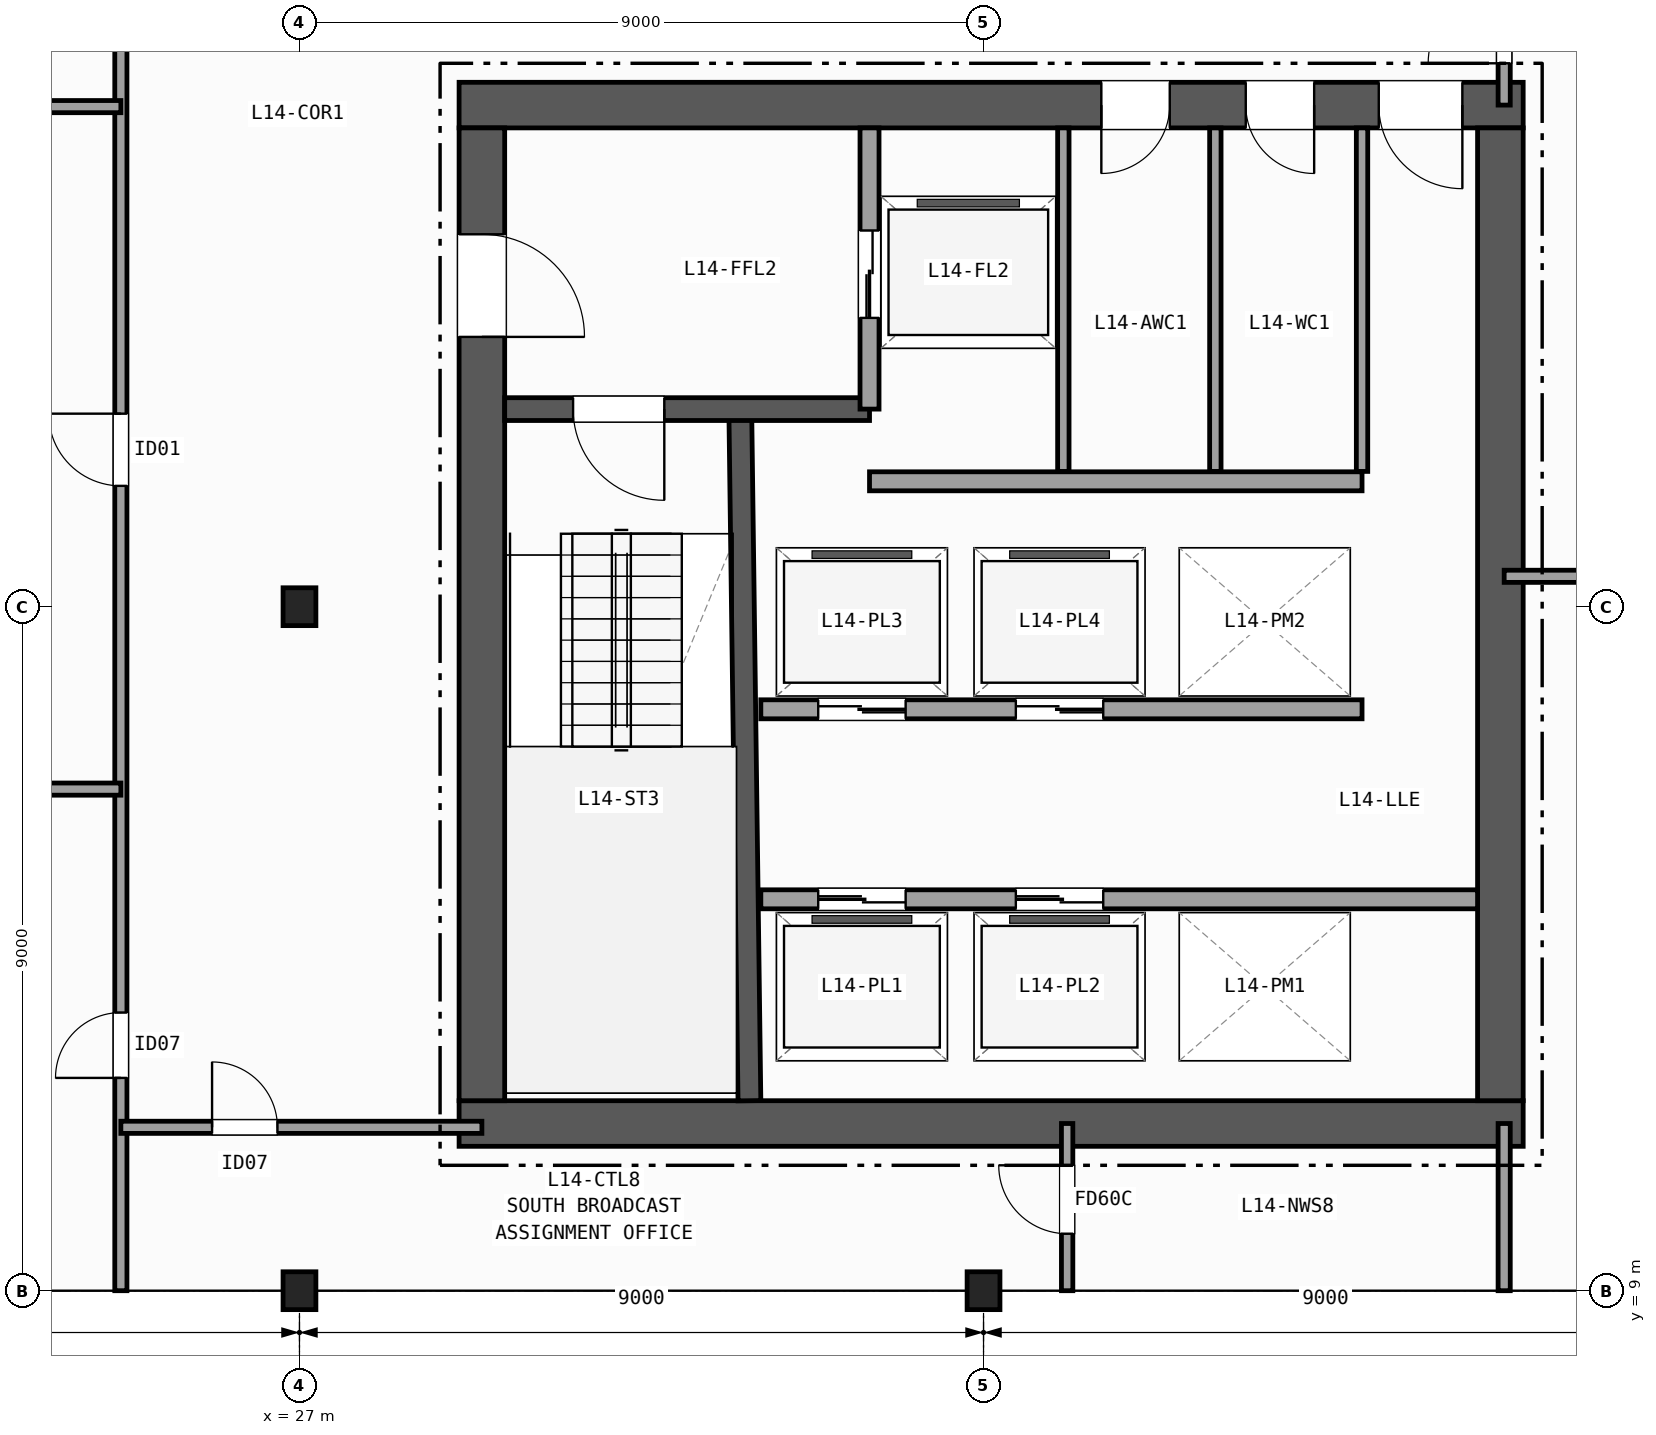
"""IFC4 building model, lengths in metres.
Left out: names, types, materials, properties, quantities, classifications, styles, units other than length and angle.
Written with IfcOpenShell. Run it as: python <this file> out.ifc"""

import sys

from ifc_helpers import new_model, si_unit, direction, frame, frame_2d, origin, origin_2d, place, context, subcontext, project, spatial, rectangle, i_section, extrude, element, fill, save


model = new_model("IFC4")
c1 = context("Model", 3, precision=1e-05, world=origin(), true_north=direction((0.0, 1.0)))
c2 = subcontext(c1, "Body", "Model", "MODEL_VIEW")
j1 = project(units=[si_unit("LENGTHUNIT", "METRE"), si_unit("PLANEANGLEUNIT", "RADIAN")], contexts=[c1])
p1 = place(None, origin())
s1 = spatial("IfcSite", under=j1, at=p1, CompositionType="ELEMENT")
p2 = place(p1, origin())
s2 = spatial("IfcBuilding", under=s1, at=p2, CompositionType="ELEMENT")
p3 = place(p2, frame((0.0, 0.0, 61.9)))
s3 = spatial("IfcBuildingStorey", under=s2, at=p3, CompositionType="ELEMENT", Elevation=61.9)
for number, where, z_axis, x_axis in (
    (1, (27.0, 9.0, 0.0), (0.0, 0.0, 1.0), (1.0, 0.0, 0.0)),
    (2, (27.0, 18.0, 0.0), (0.0, 0.0, 1.0), (1.0, 0.0, 0.0)),
    (3, (36.0, 9.0, 0.0), (0.0, 0.0, 1.0), (1.0, 0.0, 0.0)),
):
    element("IfcColumn", number, at=place(p3, frame(where, z_axis=z_axis, x_axis=x_axis)), inside=s3, PredefinedType="COLUMN", context=c2, shape_type="SweptSolid", body=[
        extrude(i_section(OverallWidth=0.432, OverallDepth=0.498, WebThickness=0.056, FlangeThickness=0.089, FilletRadius=0.015, at=origin_2d()), origin(), (0.0, 0.0, 1.0), 3.7),
    ])
p4 = place(p3, frame((29.1, 11.2, 0.0), z_axis=(0.0, 0.0, 1.0), x_axis=(1.0, 0.0, 0.0)))
e4 = element("IfcWall", 4, at=p4, inside=s3, PredefinedType="SHEAR", context=c2, shape_type="SweptSolid", body=[
    extrude(rectangle(XDim=14.0, YDim=0.6, at=frame_2d((7.0, 0.0))), origin(), (0.0, 0.0, 1.0), 3.42),
])
p5 = place(p3, frame((43.1, 24.6, 0.0), z_axis=(0.0, 0.0, 1.0), x_axis=(-1.0, 0.0, 0.0)))
e5 = element("IfcWall", 5, at=p5, inside=s3, PredefinedType="SHEAR", context=c2, shape_type="SweptSolid", body=[
    extrude(rectangle(XDim=14.0, YDim=0.6, at=frame_2d((7.0, 0.0))), origin(), (0.0, 0.0, 1.0), 3.42),
])
p6 = place(p5, frame((0.8, 0.0, 0.0)))
e6 = element("IfcOpeningElement", 6, at=p6, cuts=e5, PredefinedType="OPENING", context=c2, shape_type="SweptSolid", body=[
    extrude(rectangle(XDim=1.1, YDim=2.15, at=frame_2d((0.55, 1.075))), frame((0.0, 0.31, 0.0), z_axis=(0.0, -1.0, 0.0), x_axis=(1.0, 0.0, 0.0)), (0.0, 0.0, 1.0), 0.62),
])
p7 = place(p5, frame((2.75, 0.0, 0.0)))
e7 = element("IfcOpeningElement", 7, at=p7, cuts=e5, PredefinedType="OPENING", context=c2, shape_type="SweptSolid", body=[
    extrude(rectangle(XDim=0.9, YDim=2.1, at=frame_2d((0.45, 1.05))), frame((0.0, 0.31, 0.0), z_axis=(0.0, -1.0, 0.0), x_axis=(1.0, 0.0, 0.0)), (0.0, 0.0, 1.0), 0.62),
])
p8 = place(p5, frame((4.65, 0.0, 0.0)))
e8 = element("IfcOpeningElement", 8, at=p8, cuts=e5, PredefinedType="OPENING", context=c2, shape_type="SweptSolid", body=[
    extrude(rectangle(XDim=0.9, YDim=2.1, at=frame_2d((0.45, 1.05))), frame((0.0, 0.31, 0.0), z_axis=(0.0, -1.0, 0.0), x_axis=(1.0, 0.0, 0.0)), (0.0, 0.0, 1.0), 0.62),
])
p9 = place(p3, frame((29.4, 24.3, 0.0), z_axis=(0.0, 0.0, 1.0), x_axis=(0.0, -1.0, 0.0)))
e9 = element("IfcWall", 9, at=p9, inside=s3, PredefinedType="SHEAR", context=c2, shape_type="SweptSolid", body=[
    extrude(rectangle(XDim=12.8, YDim=0.6, at=frame_2d((6.4, 0.0))), origin(), (0.0, 0.0, 1.0), 3.42),
])
p10 = place(p9, frame((1.4, 0.0, 0.0)))
e10 = element("IfcOpeningElement", 10, at=p10, cuts=e9, PredefinedType="OPENING", context=c2, shape_type="SweptSolid", body=[
    extrude(rectangle(XDim=1.35, YDim=2.15, at=frame_2d((0.675, 1.075))), frame((0.0, 0.31, 0.0), z_axis=(0.0, -1.0, 0.0), x_axis=(1.0, 0.0, 0.0)), (0.0, 0.0, 1.0), 0.62),
])
p11 = place(p3, frame((42.8, 11.5, 0.0), z_axis=(0.0, 0.0, 1.0), x_axis=(0.0, 1.0, 0.0)))
e11 = element("IfcWall", 11, at=p11, inside=s3, PredefinedType="SHEAR", context=c2, shape_type="SweptSolid", body=[
    extrude(rectangle(XDim=12.8, YDim=0.6, at=frame_2d((6.4, 0.0))), origin(), (0.0, 0.0, 1.0), 3.42),
])
p12 = place(p3, frame((32.92, 11.5, 0.0), z_axis=(0.0, 0.0, 1.0), x_axis=(-0.013244407292, 0.999912288991, 0.0)))
e12 = element("IfcWall", 12, at=p12, inside=s3, PredefinedType="SHEAR", context=c2, shape_type="SweptSolid", body=[
    extrude(rectangle(XDim=9.051, YDim=0.3, at=frame_2d((4.525, 0.0))), origin(), (0.0, 0.0, 1.0), 3.42),
])
p13 = place(p3, frame((34.5, 20.6, 0.0), z_axis=(0.0, 0.0, 1.0), x_axis=(-1.0, 0.0, 0.0)))
e13 = element("IfcWall", 13, at=p13, inside=s3, PredefinedType="SHEAR", context=c2, shape_type="SweptSolid", body=[
    extrude(rectangle(XDim=4.8, YDim=0.3, at=frame_2d((2.4, 0.0))), origin(), (0.0, 0.0, 1.0), 3.42),
])
p14 = place(p13, frame((2.7, 0.0, 0.0)))
e14 = element("IfcOpeningElement", 14, at=p14, cuts=e13, PredefinedType="OPENING", context=c2, shape_type="SweptSolid", body=[
    extrude(rectangle(XDim=1.2, YDim=2.15, at=frame_2d((0.6, 1.075))), frame((0.0, 0.16, 0.0), z_axis=(0.0, -1.0, 0.0), x_axis=(1.0, 0.0, 0.0)), (0.0, 0.0, 1.0), 0.32),
])
p15 = place(p3, frame((34.5, 20.6, 0.0), z_axis=(0.0, 0.0, 1.0), x_axis=(0.0, 1.0, 0.0)))
e15 = element("IfcWall", 15, at=p15, inside=s3, PredefinedType="PARTITIONING", context=c2, shape_type="SweptSolid", body=[
    extrude(rectangle(XDim=3.7, YDim=0.25, at=frame_2d((1.85, 0.0))), origin(), (0.0, 0.0, 1.0), 3.42),
])
p16 = place(p15, frame((1.2, 0.0, 0.0)))
e16 = element("IfcOpeningElement", 16, at=p16, cuts=e15, PredefinedType="OPENING", context=c2, shape_type="SweptSolid", body=[
    extrude(rectangle(XDim=1.15, YDim=2.15, at=frame_2d((0.575, 1.075))), frame((0.0, 0.135, 0.0), z_axis=(0.0, -1.0, 0.0), x_axis=(1.0, 0.0, 0.0)), (0.0, 0.0, 1.0), 0.27),
])
p17 = place(p3, frame((34.5, 19.65, 0.0), z_axis=(0.0, 0.0, 1.0), x_axis=(1.0, 0.0, 0.0)))
e17 = element("IfcWall", 17, at=p17, inside=s3, PredefinedType="PARTITIONING", context=c2, shape_type="SweptSolid", body=[
    extrude(rectangle(XDim=6.48, YDim=0.25, at=frame_2d((3.24, 0.0))), origin(), (0.0, 0.0, 1.0), 3.42),
])
p18 = place(p3, frame((33.07, 14.15, 0.0), z_axis=(0.0, 0.0, 1.0), x_axis=(1.0, 0.0, 0.0)))
e18 = element("IfcWall", 18, at=p18, inside=s3, PredefinedType="PARTITIONING", context=c2, shape_type="SweptSolid", body=[
    extrude(rectangle(XDim=9.43, YDim=0.25, at=frame_2d((4.715, 0.0))), origin(), (0.0, 0.0, 1.0), 3.42),
])
p19 = place(p18, frame((0.755, 0.0, 0.0)))
e19 = element("IfcOpeningElement", 19, at=p19, cuts=e18, PredefinedType="OPENING", context=c2, shape_type="SweptSolid", body=[
    extrude(rectangle(XDim=1.15, YDim=2.15, at=frame_2d((0.575, 1.075))), frame((0.0, 0.135, 0.0), z_axis=(0.0, -1.0, 0.0), x_axis=(1.0, 0.0, 0.0)), (0.0, 0.0, 1.0), 0.27),
])
p20 = place(p18, frame((3.355, 0.0, 0.0)))
e20 = element("IfcOpeningElement", 20, at=p20, cuts=e18, PredefinedType="OPENING", context=c2, shape_type="SweptSolid", body=[
    extrude(rectangle(XDim=1.15, YDim=2.15, at=frame_2d((0.575, 1.075))), frame((0.0, 0.135, 0.0), z_axis=(0.0, -1.0, 0.0), x_axis=(1.0, 0.0, 0.0)), (0.0, 0.0, 1.0), 0.27),
])
p21 = place(p3, frame((40.98, 16.65, 0.0), z_axis=(0.0, 0.0, 1.0), x_axis=(-1.0, 0.0, 0.0)))
e21 = element("IfcWall", 21, at=p21, inside=s3, PredefinedType="PARTITIONING", context=c2, shape_type="SweptSolid", body=[
    extrude(rectangle(XDim=7.91, YDim=0.25, at=frame_2d((3.955, 0.0))), origin(), (0.0, 0.0, 1.0), 3.42),
])
p22 = place(p21, frame((6.005, 0.0, 0.0)))
e22 = element("IfcOpeningElement", 22, at=p22, cuts=e21, PredefinedType="OPENING", context=c2, shape_type="SweptSolid", body=[
    extrude(rectangle(XDim=1.15, YDim=2.15, at=frame_2d((0.575, 1.075))), frame((0.0, 0.135, 0.0), z_axis=(0.0, -1.0, 0.0), x_axis=(1.0, 0.0, 0.0)), (0.0, 0.0, 1.0), 0.27),
])
p23 = place(p21, frame((3.405, 0.0, 0.0)))
e23 = element("IfcOpeningElement", 23, at=p23, cuts=e21, PredefinedType="OPENING", context=c2, shape_type="SweptSolid", body=[
    extrude(rectangle(XDim=1.15, YDim=2.15, at=frame_2d((0.575, 1.075))), frame((0.0, 0.135, 0.0), z_axis=(0.0, -1.0, 0.0), x_axis=(1.0, 0.0, 0.0)), (0.0, 0.0, 1.0), 0.27),
])
for number, where, z_axis, x_axis in (
    (24, (37.05, 19.78, 0.0), (0.0, 0.0, 1.0), (0.0, 1.0, 0.0)),
    (25, (39.05, 19.78, 0.0), (0.0, 0.0, 1.0), (0.0, 1.0, 0.0)),
    (26, (40.98, 19.78, 0.0), (0.0, 0.0, 1.0), (0.0, 1.0, 0.0)),
):
    element("IfcWall", number, at=place(p3, frame(where, z_axis=z_axis, x_axis=x_axis)), inside=s3, PredefinedType="PARTITIONING", context=c2, shape_type="SweptSolid", body=[
        extrude(rectangle(XDim=4.52, YDim=0.15, at=frame_2d((2.26, 0.0))), origin(), (0.0, 0.0, 1.0), 3.42),
    ])
p24 = place(p3, frame((24.65, 9.0, 0.0), z_axis=(0.0, 0.0, 1.0), x_axis=(0.0, 1.0, 0.0)))
e27 = element("IfcWall", 27, at=p24, inside=s3, PredefinedType="PARTITIONING", context=c2, shape_type="SweptSolid", body=[
    extrude(rectangle(XDim=19.2, YDim=0.16, at=frame_2d((9.6, 0.0))), origin(), (0.0, 0.0, 1.0), 2.627),
])
p25 = place(p24, frame((2.8, 0.0, 0.0)))
e28 = element("IfcOpeningElement", 28, at=p25, cuts=e27, PredefinedType="OPENING", context=c2, shape_type="SweptSolid", body=[
    extrude(rectangle(XDim=0.86, YDim=2.05, at=frame_2d((0.43, 1.025))), frame((0.0, 0.09, 0.0), z_axis=(0.0, -1.0, 0.0), x_axis=(1.0, 0.0, 0.0)), (0.0, 0.0, 1.0), 0.18),
])
p26 = place(p24, frame((10.59, 0.0, 0.0)))
e29 = element("IfcOpeningElement", 29, at=p26, cuts=e27, PredefinedType="OPENING", context=c2, shape_type="SweptSolid", body=[
    extrude(rectangle(XDim=0.95, YDim=2.1, at=frame_2d((0.475, 1.05))), frame((0.0, 0.09, 0.0), z_axis=(0.0, -1.0, 0.0), x_axis=(1.0, 0.0, 0.0)), (0.0, 0.0, 1.0), 0.18),
])
p27 = place(p3, frame((9.0, 24.58, 0.0), z_axis=(0.0, 0.0, 1.0), x_axis=(1.0, 0.0, 0.0)))
e30 = element("IfcWall", 30, at=p27, inside=s3, PredefinedType="PARTITIONING", context=c2, shape_type="SweptSolid", body=[
    extrude(rectangle(XDim=15.65, YDim=0.16, at=frame_2d((7.825, 0.0))), origin(), (0.0, 0.0, 1.0), 2.627),
])
p28 = place(p3, frame((18.0, 15.6, 0.0), z_axis=(0.0, 0.0, 1.0), x_axis=(1.0, 0.0, 0.0)))
e31 = element("IfcWall", 31, at=p28, inside=s3, PredefinedType="PARTITIONING", context=c2, shape_type="SweptSolid", body=[
    extrude(rectangle(XDim=6.65, YDim=0.16, at=frame_2d((3.325, 0.0))), origin(), (0.0, 0.0, 1.0), 2.789),
])
p29 = place(p3, frame((24.65, 11.15, 0.0), z_axis=(0.0, 0.0, 1.0), x_axis=(1.0, 0.0, 0.0)))
e32 = element("IfcWall", 32, at=p29, inside=s3, PredefinedType="PARTITIONING", context=c2, shape_type="SweptSolid", body=[
    extrude(rectangle(XDim=4.75, YDim=0.16, at=frame_2d((2.375, 0.0))), origin(), (0.0, 0.0, 1.0), 2.792),
])
p30 = place(p29, frame((1.2, 0.0, 0.0)))
e33 = element("IfcOpeningElement", 33, at=p30, cuts=e32, PredefinedType="OPENING", context=c2, shape_type="SweptSolid", body=[
    extrude(rectangle(XDim=0.86, YDim=2.05, at=frame_2d((0.43, 1.025))), frame((0.0, 0.09, 0.0), z_axis=(0.0, -1.0, 0.0), x_axis=(1.0, 0.0, 0.0)), (0.0, 0.0, 1.0), 0.18),
])
p31 = place(p3, frame((37.1, 9.0, 0.0), z_axis=(0.0, 0.0, 1.0), x_axis=(0.0, 1.0, 0.0)))
e34 = element("IfcWall", 34, at=p31, inside=s3, PredefinedType="PARTITIONING", context=c2, shape_type="SweptSolid", body=[
    extrude(rectangle(XDim=2.2, YDim=0.15, at=frame_2d((1.1, 0.0))), origin(), (0.0, 0.0, 1.0), 2.627),
])
p32 = place(p31, frame((0.75, 0.0, 0.0)))
e35 = element("IfcOpeningElement", 35, at=p32, cuts=e34, PredefinedType="OPENING", context=c2, shape_type="SweptSolid", body=[
    extrude(rectangle(XDim=0.9, YDim=2.1, at=frame_2d((0.45, 1.05))), frame((0.0, 0.085, 0.0), z_axis=(0.0, -1.0, 0.0), x_axis=(1.0, 0.0, 0.0)), (0.0, 0.0, 1.0), 0.17),
])
p33 = place(p3, frame((42.85, 9.0, 0.0), z_axis=(0.0, 0.0, 1.0), x_axis=(0.0, 1.0, 0.0)))
e36 = element("IfcWall", 36, at=p33, inside=s3, PredefinedType="PARTITIONING", context=c2, shape_type="SweptSolid", body=[
    extrude(rectangle(XDim=2.2, YDim=0.16, at=frame_2d((1.1, 0.0))), origin(), (0.0, 0.0, 1.0), 2.627),
])
p34 = place(p3, frame((42.85, 24.6, 0.0), z_axis=(0.0, 0.0, 1.0), x_axis=(0.0, 1.0, 0.0)))
e37 = element("IfcWall", 37, at=p34, inside=s3, PredefinedType="PARTITIONING", context=c2, shape_type="SweptSolid", body=[
    extrude(rectangle(XDim=2.4, YDim=0.16, at=frame_2d((1.2, 0.0))), origin(), (0.0, 0.0, 1.0), 2.627),
])
p35 = place(p34, frame((0.55, 0.0, 0.0)))
e38 = element("IfcOpeningElement", 38, at=p35, cuts=e37, PredefinedType="OPENING", context=c2, shape_type="SweptSolid", body=[
    extrude(rectangle(XDim=1.0, YDim=2.1, at=frame_2d((0.5, 1.05))), frame((0.0, 0.09, 0.0), z_axis=(0.0, -1.0, 0.0), x_axis=(1.0, 0.0, 0.0)), (0.0, 0.0, 1.0), 0.18),
])
p36 = place(p3, frame((42.85, 18.4, 0.0), z_axis=(0.0, 0.0, 1.0), x_axis=(1.0, 0.0, 0.0)))
e39 = element("IfcWall", 39, at=p36, inside=s3, PredefinedType="PARTITIONING", context=c2, shape_type="SweptSolid", body=[
    extrude(rectangle(XDim=20.809, YDim=0.16, at=frame_2d((10.404, 0.0))), origin(), (0.0, 0.0, 1.0), 3.42),
])
p37 = place(p36, frame((2.95, 0.0, 0.0)))
e40 = element("IfcOpeningElement", 40, at=p37, cuts=e39, PredefinedType="OPENING", context=c2, shape_type="SweptSolid", body=[
    extrude(rectangle(XDim=1.05, YDim=2.15, at=frame_2d((0.525, 1.075))), frame((0.0, 0.09, 0.0), z_axis=(0.0, -1.0, 0.0), x_axis=(1.0, 0.0, 0.0)), (0.0, 0.0, 1.0), 0.18),
])
p38 = place(p14, origin())
e41 = element("IfcDoor", 41, at=p38, inside=s3, OperationType="SINGLE_SWING_LEFT", PredefinedType="DOOR", context=c2, shape_type="SweptSolid", body=[
    extrude(rectangle(XDim=1.2, YDim=2.15, at=frame_2d((0.6, 1.075))), frame((0.0, 0.025, 0.0), z_axis=(0.0, -1.0, 0.0), x_axis=(1.0, 0.0, 0.0)), (0.0, 0.0, 1.0), 0.05),
])
fill(e14, e41)
p39 = place(p10, origin())
e42 = element("IfcDoor", 42, at=p39, inside=s3, OperationType="SINGLE_SWING_RIGHT", PredefinedType="DOOR", context=c2, shape_type="SweptSolid", body=[
    extrude(rectangle(XDim=1.35, YDim=2.15, at=frame_2d((0.675, 1.075))), frame((0.0, 0.025, 0.0), z_axis=(0.0, -1.0, 0.0), x_axis=(1.0, 0.0, 0.0)), (0.0, 0.0, 1.0), 0.05),
])
fill(e10, e42)
p40 = place(p6, origin())
e43 = element("IfcDoor", 43, at=p40, inside=s3, OperationType="SINGLE_SWING_LEFT", PredefinedType="DOOR", context=c2, shape_type="SweptSolid", body=[
    extrude(rectangle(XDim=1.1, YDim=2.15, at=frame_2d((0.55, 1.075))), frame((0.0, 0.025, 0.0), z_axis=(0.0, -1.0, 0.0), x_axis=(1.0, 0.0, 0.0)), (0.0, 0.0, 1.0), 0.05),
])
fill(e6, e43)
p41 = place(p7, origin())
e44 = element("IfcDoor", 44, at=p41, inside=s3, OperationType="SINGLE_SWING_LEFT", PredefinedType="DOOR", context=c2, shape_type="SweptSolid", body=[
    extrude(rectangle(XDim=0.9, YDim=2.1, at=frame_2d((0.45, 1.05))), frame((0.0, 0.025, 0.0), z_axis=(0.0, -1.0, 0.0), x_axis=(1.0, 0.0, 0.0)), (0.0, 0.0, 1.0), 0.05),
])
fill(e7, e44)
p42 = place(p8, origin())
e45 = element("IfcDoor", 45, at=p42, inside=s3, OperationType="SINGLE_SWING_RIGHT", PredefinedType="DOOR", context=c2, shape_type="SweptSolid", body=[
    extrude(rectangle(XDim=0.9, YDim=2.1, at=frame_2d((0.45, 1.05))), frame((0.0, 0.025, 0.0), z_axis=(0.0, -1.0, 0.0), x_axis=(1.0, 0.0, 0.0)), (0.0, 0.0, 1.0), 0.05),
])
fill(e8, e45)
p43 = place(p16, origin())
e46 = element("IfcDoor", 46, at=p43, inside=s3, OperationType="DOUBLE_DOOR_SLIDING", PredefinedType="DOOR", context=c2, shape_type="SweptSolid", body=[
    extrude(rectangle(XDim=1.15, YDim=2.15, at=frame_2d((0.575, 1.075))), frame((0.0, 0.025, 0.0), z_axis=(0.0, -1.0, 0.0), x_axis=(1.0, 0.0, 0.0)), (0.0, 0.0, 1.0), 0.05),
])
fill(e16, e46)
p44 = place(p19, origin())
e47 = element("IfcDoor", 47, at=p44, inside=s3, OperationType="DOUBLE_DOOR_SLIDING", PredefinedType="DOOR", context=c2, shape_type="SweptSolid", body=[
    extrude(rectangle(XDim=1.15, YDim=2.15, at=frame_2d((0.575, 1.075))), frame((0.0, 0.025, 0.0), z_axis=(0.0, -1.0, 0.0), x_axis=(1.0, 0.0, 0.0)), (0.0, 0.0, 1.0), 0.05),
])
fill(e19, e47)
p45 = place(p20, origin())
e48 = element("IfcDoor", 48, at=p45, inside=s3, OperationType="DOUBLE_DOOR_SLIDING", PredefinedType="DOOR", context=c2, shape_type="SweptSolid", body=[
    extrude(rectangle(XDim=1.15, YDim=2.15, at=frame_2d((0.575, 1.075))), frame((0.0, 0.025, 0.0), z_axis=(0.0, -1.0, 0.0), x_axis=(1.0, 0.0, 0.0)), (0.0, 0.0, 1.0), 0.05),
])
fill(e20, e48)
p46 = place(p22, origin())
e49 = element("IfcDoor", 49, at=p46, inside=s3, OperationType="DOUBLE_DOOR_SLIDING", PredefinedType="DOOR", context=c2, shape_type="SweptSolid", body=[
    extrude(rectangle(XDim=1.15, YDim=2.15, at=frame_2d((0.575, 1.075))), frame((0.0, 0.025, 0.0), z_axis=(0.0, -1.0, 0.0), x_axis=(1.0, 0.0, 0.0)), (0.0, 0.0, 1.0), 0.05),
])
fill(e22, e49)
p47 = place(p23, origin())
e50 = element("IfcDoor", 50, at=p47, inside=s3, OperationType="DOUBLE_DOOR_SLIDING", PredefinedType="DOOR", context=c2, shape_type="SweptSolid", body=[
    extrude(rectangle(XDim=1.15, YDim=2.15, at=frame_2d((0.575, 1.075))), frame((0.0, 0.025, 0.0), z_axis=(0.0, -1.0, 0.0), x_axis=(1.0, 0.0, 0.0)), (0.0, 0.0, 1.0), 0.05),
])
fill(e23, e50)
p48 = place(p25, origin())
e51 = element("IfcDoor", 51, at=p48, inside=s3, OperationType="SINGLE_SWING_LEFT", PredefinedType="DOOR", context=c2, shape_type="SweptSolid", body=[
    extrude(rectangle(XDim=0.86, YDim=2.05, at=frame_2d((0.43, 1.025))), frame((0.0, 0.025, 0.0), z_axis=(0.0, -1.0, 0.0), x_axis=(1.0, 0.0, 0.0)), (0.0, 0.0, 1.0), 0.05),
])
fill(e28, e51)
p49 = place(p26, origin())
e52 = element("IfcDoor", 52, at=p49, inside=s3, OperationType="SINGLE_SWING_RIGHT", PredefinedType="DOOR", context=c2, shape_type="SweptSolid", body=[
    extrude(rectangle(XDim=0.95, YDim=2.1, at=frame_2d((0.475, 1.05))), frame((0.0, 0.025, 0.0), z_axis=(0.0, -1.0, 0.0), x_axis=(1.0, 0.0, 0.0)), (0.0, 0.0, 1.0), 0.05),
])
fill(e29, e52)
p50 = place(p30, origin())
e53 = element("IfcDoor", 53, at=p50, inside=s3, OperationType="SINGLE_SWING_LEFT", PredefinedType="DOOR", context=c2, shape_type="SweptSolid", body=[
    extrude(rectangle(XDim=0.86, YDim=2.05, at=frame_2d((0.43, 1.025))), frame((0.0, 0.025, 0.0), z_axis=(0.0, -1.0, 0.0), x_axis=(1.0, 0.0, 0.0)), (0.0, 0.0, 1.0), 0.05),
])
fill(e33, e53)
p51 = place(p32, origin())
e54 = element("IfcDoor", 54, at=p51, inside=s3, OperationType="SINGLE_SWING_RIGHT", PredefinedType="DOOR", context=c2, shape_type="SweptSolid", body=[
    extrude(rectangle(XDim=0.9, YDim=2.1, at=frame_2d((0.45, 1.05))), frame((0.0, 0.025, 0.0), z_axis=(0.0, -1.0, 0.0), x_axis=(1.0, 0.0, 0.0)), (0.0, 0.0, 1.0), 0.05),
])
fill(e35, e54)
p52 = place(p35, origin())
e55 = element("IfcDoor", 55, at=p52, inside=s3, OperationType="SINGLE_SWING_LEFT", PredefinedType="DOOR", context=c2, shape_type="SweptSolid", body=[
    extrude(rectangle(XDim=1.0, YDim=2.1, at=frame_2d((0.5, 1.05))), frame((0.0, 0.025, 0.0), z_axis=(0.0, -1.0, 0.0), x_axis=(1.0, 0.0, 0.0)), (0.0, 0.0, 1.0), 0.05),
])
fill(e38, e55)
save(model, sys.argv[1])
